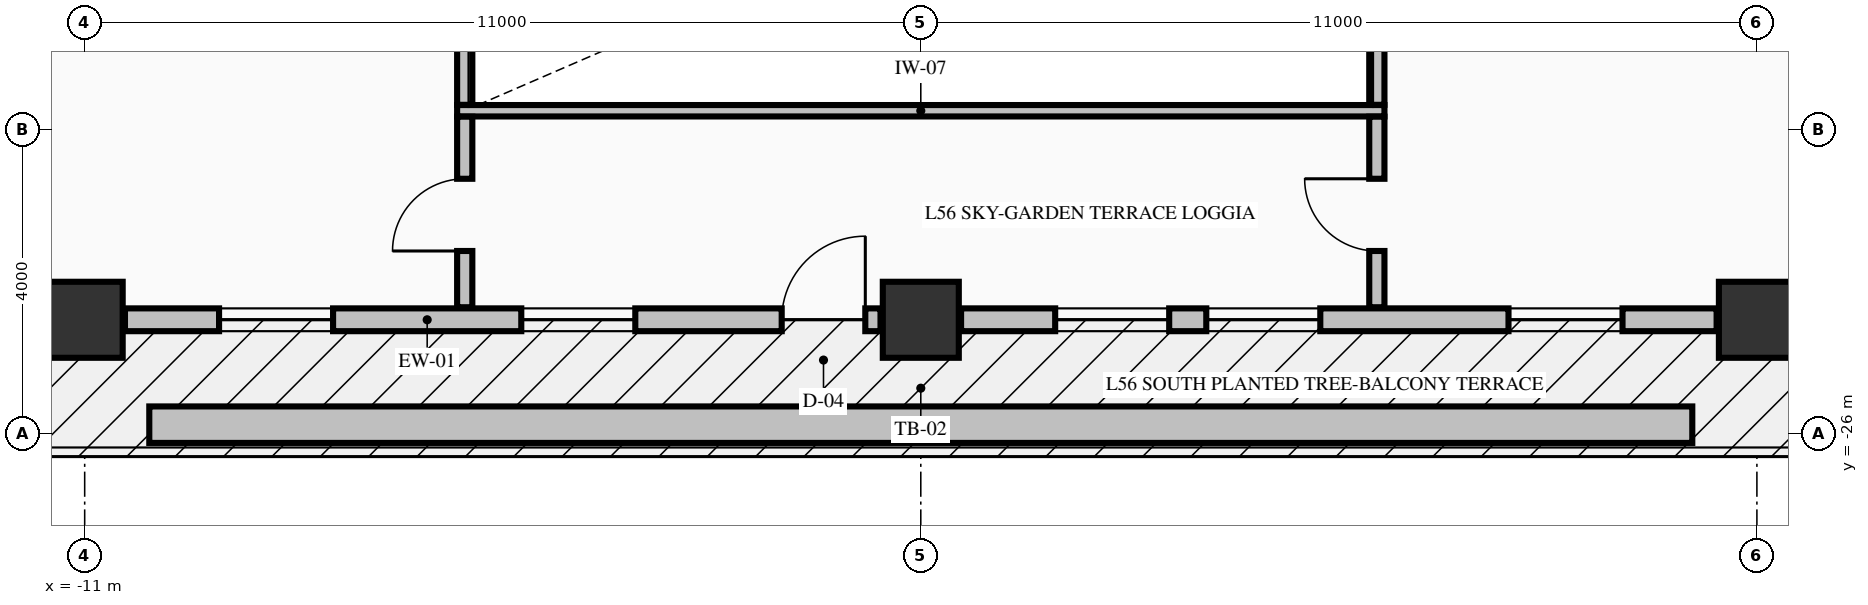
"""IFC4 building model, lengths in metres.
Left out: names, types, materials, properties, quantities, classifications, styles, units other than length and angle.
Written with IfcOpenShell. Run it as: python <this file> out.ifc"""

import sys

from ifc_helpers import new_model, si_unit, direction, frame, frame_2d, origin, origin_2d, place, context, subcontext, project, spatial, rectangle, extrude, element, fill, save


model = new_model("IFC4")
c1 = context("Model", 3, precision=1e-05, world=origin(), true_north=direction((0.0, 1.0)))
c2 = subcontext(c1, "Body", "Model", "MODEL_VIEW")
j1 = project(units=[si_unit("LENGTHUNIT", "METRE"), si_unit("PLANEANGLEUNIT", "RADIAN")], contexts=[c1])
p1 = place(None, origin())
s1 = spatial("IfcSite", under=j1, at=p1, CompositionType="ELEMENT")
p2 = place(p1, origin())
s2 = spatial("IfcBuilding", under=s1, at=p2, CompositionType="ELEMENT")
p3 = place(p2, frame((0.0, 0.0, 215.26)))
s3 = spatial("IfcBuildingStorey", under=s2, at=p3, CompositionType="ELEMENT", Elevation=215.26)
for number, where, z_axis, x_axis in (
    (1, (-11.0, -24.5, -0.25), (0.0, 0.0, 1.0), (1.0, 0.0, 0.0)),
    (2, (0.0, -24.5, -0.25), (0.0, 0.0, 1.0), (1.0, 0.0, 0.0)),
    (3, (11.0, -24.5, -0.25), (0.0, 0.0, 1.0), (1.0, 0.0, 0.0)),
):
    element("IfcColumn", number, at=place(p3, frame(where, z_axis=z_axis, x_axis=x_axis)), inside=s3, PredefinedType="COLUMN", context=c2, shape_type="SweptSolid", body=[
        extrude(rectangle(XDim=1.0, YDim=1.0, at=origin_2d()), origin(), (0.0, 0.0, 1.0), 3.4),
    ])
p4 = place(p3, frame((-10.47, -24.5, 0.0), z_axis=(0.0, 0.0, 1.0), x_axis=(1.0, 0.0, 0.0)))
e4 = element("IfcWall", 4, at=p4, inside=s3, PredefinedType="STANDARD", context=c2, shape_type="SweptSolid", body=[
    extrude(rectangle(XDim=9.94, YDim=0.3, at=frame_2d((4.97, 0.0))), origin(), (0.0, 0.0, 1.0), 2.542),
])
p5 = place(p4, frame((8.64, 0.0, 0.0)))
e5 = element("IfcOpeningElement", 5, at=p5, cuts=e4, PredefinedType="OPENING", context=c2, shape_type="SweptSolid", body=[
    extrude(rectangle(XDim=1.1, YDim=2.15, at=frame_2d((0.55, 1.075))), frame((0.0, 0.16, 0.0), z_axis=(0.0, -1.0, 0.0), x_axis=(1.0, 0.0, 0.0)), (0.0, 0.0, 1.0), 0.32),
])
p6 = place(p4, frame((1.238, 0.0, 0.72)))
e6 = element("IfcOpeningElement", 6, at=p6, cuts=e4, PredefinedType="OPENING", context=c2, shape_type="SweptSolid", body=[
    extrude(rectangle(XDim=1.5, YDim=1.6, at=frame_2d((0.75, 0.8))), frame((0.0, 0.16, 0.0), z_axis=(0.0, -1.0, 0.0), x_axis=(1.0, 0.0, 0.0)), (0.0, 0.0, 1.0), 0.32),
])
p7 = place(p4, frame((5.214, 0.0, 0.72)))
e7 = element("IfcOpeningElement", 7, at=p7, cuts=e4, PredefinedType="OPENING", context=c2, shape_type="SweptSolid", body=[
    extrude(rectangle(XDim=1.5, YDim=1.6, at=frame_2d((0.75, 0.8))), frame((0.0, 0.16, 0.0), z_axis=(0.0, -1.0, 0.0), x_axis=(1.0, 0.0, 0.0)), (0.0, 0.0, 1.0), 0.32),
])
p8 = place(p3, frame((0.53, -24.5, 0.0), z_axis=(0.0, 0.0, 1.0), x_axis=(1.0, 0.0, 0.0)))
e8 = element("IfcWall", 8, at=p8, inside=s3, PredefinedType="STANDARD", context=c2, shape_type="SweptSolid", body=[
    extrude(rectangle(XDim=9.94, YDim=0.3, at=frame_2d((4.97, 0.0))), origin(), (0.0, 0.0, 1.0), 2.542),
])
p9 = place(p8, frame((1.238, 0.0, 0.72)))
e9 = element("IfcOpeningElement", 9, at=p9, cuts=e8, PredefinedType="OPENING", context=c2, shape_type="SweptSolid", body=[
    extrude(rectangle(XDim=1.5, YDim=1.6, at=frame_2d((0.75, 0.8))), frame((0.0, 0.16, 0.0), z_axis=(0.0, -1.0, 0.0), x_axis=(1.0, 0.0, 0.0)), (0.0, 0.0, 1.0), 0.32),
])
p10 = place(p8, frame((3.226, 0.0, 0.72)))
e10 = element("IfcOpeningElement", 10, at=p10, cuts=e8, PredefinedType="OPENING", context=c2, shape_type="SweptSolid", body=[
    extrude(rectangle(XDim=1.5, YDim=1.6, at=frame_2d((0.75, 0.8))), frame((0.0, 0.16, 0.0), z_axis=(0.0, -1.0, 0.0), x_axis=(1.0, 0.0, 0.0)), (0.0, 0.0, 1.0), 0.32),
])
p11 = place(p8, frame((7.202, 0.0, 0.72)))
e11 = element("IfcOpeningElement", 11, at=p11, cuts=e8, PredefinedType="OPENING", context=c2, shape_type="SweptSolid", body=[
    extrude(rectangle(XDim=1.5, YDim=1.6, at=frame_2d((0.75, 0.8))), frame((0.0, 0.16, 0.0), z_axis=(0.0, -1.0, 0.0), x_axis=(1.0, 0.0, 0.0)), (0.0, 0.0, 1.0), 0.32),
])
p12 = place(p3, frame((-6.1, -21.75, 0.0), z_axis=(0.0, 0.0, 1.0), x_axis=(1.0, 0.0, 0.0)))
e12 = element("IfcWall", 12, at=p12, inside=s3, PredefinedType="PARTITIONING", context=c2, shape_type="SweptSolid", body=[
    extrude(rectangle(XDim=12.2, YDim=0.15, at=frame_2d((6.1, 0.0))), origin(), (0.0, 0.0, 1.0), 3.15),
])
p13 = place(p3, frame((-6.0, -24.335, 0.0), z_axis=(0.0, 0.0, 1.0), x_axis=(0.0, 1.0, 0.0)))
e13 = element("IfcWall", 13, at=p13, inside=s3, PredefinedType="PARTITIONING", context=c2, shape_type="SweptSolid", body=[
    extrude(rectangle(XDim=2.507, YDim=0.2, at=frame_2d((1.253, 0.0))), origin(), (0.0, 0.0, 1.0), 3.15),
])
p14 = place(p13, frame((0.74, 0.0, 0.0)))
e14 = element("IfcOpeningElement", 14, at=p14, cuts=e13, PredefinedType="OPENING", context=c2, shape_type="SweptSolid", body=[
    extrude(rectangle(XDim=0.95, YDim=2.15, at=frame_2d((0.475, 1.075))), frame((0.0, 0.11, 0.0), z_axis=(0.0, -1.0, 0.0), x_axis=(1.0, 0.0, 0.0)), (0.0, 0.0, 1.0), 0.22),
])
p15 = place(p3, frame((-6.0, -21.672, 0.0), z_axis=(0.0, 0.0, 1.0), x_axis=(0.0, 1.0, 0.0)))
e15 = element("IfcWall", 15, at=p15, inside=s3, PredefinedType="PARTITIONING", context=c2, shape_type="SweptSolid", body=[
    extrude(rectangle(XDim=5.044, YDim=0.2, at=frame_2d((2.522, 0.0))), origin(), (0.0, 0.0, 1.0), 3.15),
])
p16 = place(p3, frame((6.0, -24.335, 0.0), z_axis=(0.0, 0.0, 1.0), x_axis=(0.0, 1.0, 0.0)))
e16 = element("IfcWall", 16, at=p16, inside=s3, PredefinedType="PARTITIONING", context=c2, shape_type="SweptSolid", body=[
    extrude(rectangle(XDim=2.507, YDim=0.2, at=frame_2d((1.253, 0.0))), origin(), (0.0, 0.0, 1.0), 3.15),
])
p17 = place(p16, frame((0.74, 0.0, 0.0)))
e17 = element("IfcOpeningElement", 17, at=p17, cuts=e16, PredefinedType="OPENING", context=c2, shape_type="SweptSolid", body=[
    extrude(rectangle(XDim=0.95, YDim=2.15, at=frame_2d((0.475, 1.075))), frame((0.0, 0.11, 0.0), z_axis=(0.0, -1.0, 0.0), x_axis=(1.0, 0.0, 0.0)), (0.0, 0.0, 1.0), 0.22),
])
p18 = place(p3, frame((6.0, -21.672, 0.0), z_axis=(0.0, 0.0, 1.0), x_axis=(0.0, 1.0, 0.0)))
e18 = element("IfcWall", 18, at=p18, inside=s3, PredefinedType="PARTITIONING", context=c2, shape_type="SweptSolid", body=[
    extrude(rectangle(XDim=5.044, YDim=0.2, at=frame_2d((2.522, 0.0))), origin(), (0.0, 0.0, 1.0), 3.15),
])
p19 = place(p3, frame((-10.15, -25.88, -0.04), z_axis=(0.0, 0.0, 1.0), x_axis=(1.0, 0.0, 0.0)))
e19 = element("IfcWall", 19, at=p19, inside=s3, PredefinedType="PARAPET", context=c2, shape_type="SweptSolid", body=[
    extrude(rectangle(XDim=20.3, YDim=0.48, at=frame_2d((10.15, 0.0))), origin(), (0.0, 0.0, 1.0), 0.52),
])
p20 = place(p5, origin())
e20 = element("IfcDoor", 20, at=p20, inside=s3, OperationType="SINGLE_SWING_RIGHT", PredefinedType="DOOR", context=c2, shape_type="SweptSolid", body=[
    extrude(rectangle(XDim=1.1, YDim=2.15, at=frame_2d((0.55, 1.075))), frame((0.0, 0.025, 0.0), z_axis=(0.0, -1.0, 0.0), x_axis=(1.0, 0.0, 0.0)), (0.0, 0.0, 1.0), 0.05),
])
fill(e5, e20)
p21 = place(p6, origin())
e21 = element("IfcWindow", 21, at=p21, inside=s3, PartitioningType="SINGLE_PANEL", PredefinedType="WINDOW", context=c2, shape_type="SweptSolid", body=[
    extrude(rectangle(XDim=1.5, YDim=1.6, at=frame_2d((0.75, 0.8))), frame((0.0, 0.03, 0.0), z_axis=(0.0, -1.0, 0.0), x_axis=(1.0, 0.0, 0.0)), (0.0, 0.0, 1.0), 0.06),
])
fill(e6, e21)
p22 = place(p7, origin())
e22 = element("IfcWindow", 22, at=p22, inside=s3, PartitioningType="SINGLE_PANEL", PredefinedType="WINDOW", context=c2, shape_type="SweptSolid", body=[
    extrude(rectangle(XDim=1.5, YDim=1.6, at=frame_2d((0.75, 0.8))), frame((0.0, 0.03, 0.0), z_axis=(0.0, -1.0, 0.0), x_axis=(1.0, 0.0, 0.0)), (0.0, 0.0, 1.0), 0.06),
])
fill(e7, e22)
p23 = place(p9, origin())
e23 = element("IfcWindow", 23, at=p23, inside=s3, PartitioningType="SINGLE_PANEL", PredefinedType="WINDOW", context=c2, shape_type="SweptSolid", body=[
    extrude(rectangle(XDim=1.5, YDim=1.6, at=frame_2d((0.75, 0.8))), frame((0.0, 0.03, 0.0), z_axis=(0.0, -1.0, 0.0), x_axis=(1.0, 0.0, 0.0)), (0.0, 0.0, 1.0), 0.06),
])
fill(e9, e23)
p24 = place(p10, origin())
e24 = element("IfcWindow", 24, at=p24, inside=s3, PartitioningType="SINGLE_PANEL", PredefinedType="WINDOW", context=c2, shape_type="SweptSolid", body=[
    extrude(rectangle(XDim=1.5, YDim=1.6, at=frame_2d((0.75, 0.8))), frame((0.0, 0.03, 0.0), z_axis=(0.0, -1.0, 0.0), x_axis=(1.0, 0.0, 0.0)), (0.0, 0.0, 1.0), 0.06),
])
fill(e10, e24)
p25 = place(p11, origin())
e25 = element("IfcWindow", 25, at=p25, inside=s3, PartitioningType="SINGLE_PANEL", PredefinedType="WINDOW", context=c2, shape_type="SweptSolid", body=[
    extrude(rectangle(XDim=1.5, YDim=1.6, at=frame_2d((0.75, 0.8))), frame((0.0, 0.03, 0.0), z_axis=(0.0, -1.0, 0.0), x_axis=(1.0, 0.0, 0.0)), (0.0, 0.0, 1.0), 0.06),
])
fill(e11, e25)
p26 = place(p14, origin())
e26 = element("IfcDoor", 26, at=p26, inside=s3, OperationType="SINGLE_SWING_LEFT", PredefinedType="DOOR", context=c2, shape_type="SweptSolid", body=[
    extrude(rectangle(XDim=0.95, YDim=2.15, at=frame_2d((0.475, 1.075))), frame((0.0, 0.025, 0.0), z_axis=(0.0, -1.0, 0.0), x_axis=(1.0, 0.0, 0.0)), (0.0, 0.0, 1.0), 0.05),
])
fill(e14, e26)
p27 = place(p17, origin())
e27 = element("IfcDoor", 27, at=p27, inside=s3, OperationType="SINGLE_SWING_RIGHT", PredefinedType="DOOR", context=c2, shape_type="SweptSolid", body=[
    extrude(rectangle(XDim=0.95, YDim=2.15, at=frame_2d((0.475, 1.075))), frame((0.0, 0.025, 0.0), z_axis=(0.0, -1.0, 0.0), x_axis=(1.0, 0.0, 0.0)), (0.0, 0.0, 1.0), 0.05),
])
fill(e17, e27)
save(model, sys.argv[1])
